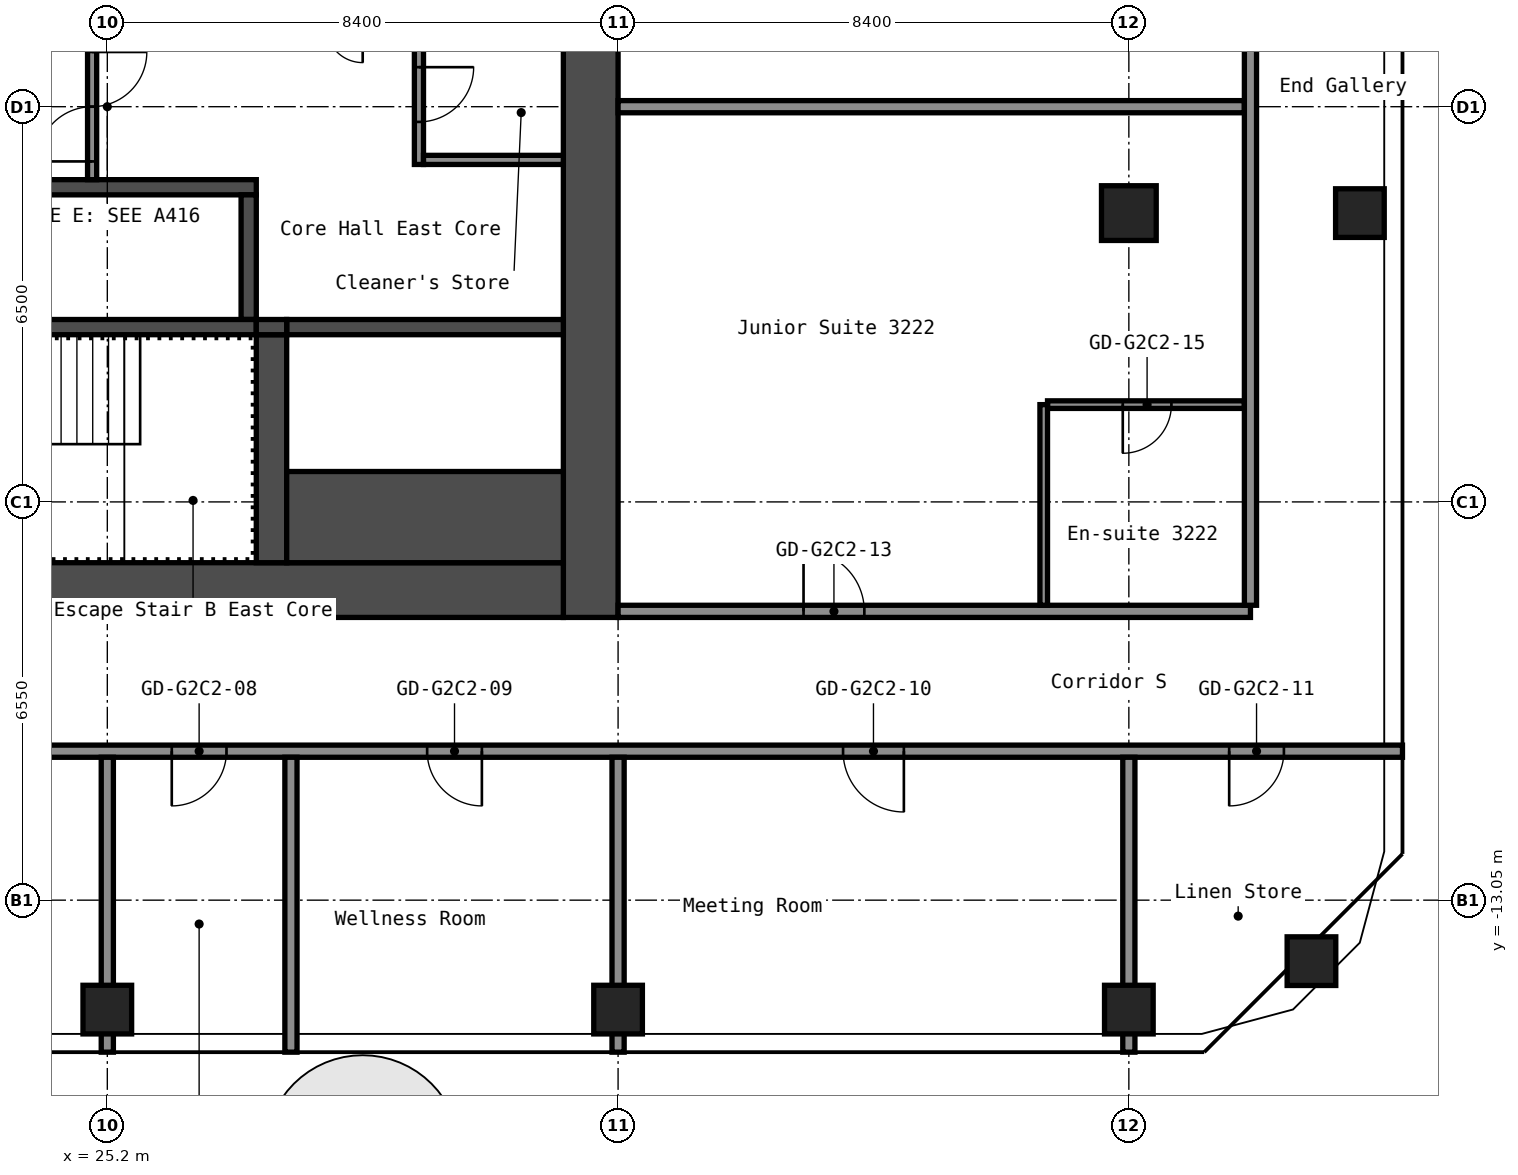
"""IFC4 building model, lengths in metres.
Left out: names, types, materials, properties, quantities, classifications, styles, units other than length and angle.
Written with IfcOpenShell. Run it as: python <this file> out.ifc"""

import sys

from ifc_helpers import new_model, si_unit, direction, frame, frame_2d, origin, origin_2d, place, context, subcontext, project, spatial, rectangle, hollow_rectangle, extrude, element, fill, save


model = new_model("IFC4")
c1 = context("Model", 3, precision=1e-05, world=origin(), true_north=direction((0.0, 1.0)))
c2 = subcontext(c1, "Body", "Model", "MODEL_VIEW")
j1 = project(units=[si_unit("LENGTHUNIT", "METRE"), si_unit("PLANEANGLEUNIT", "RADIAN")], contexts=[c1])
p1 = place(None, origin())
s1 = spatial("IfcSite", under=j1, at=p1, CompositionType="ELEMENT")
p2 = place(p1, origin())
s2 = spatial("IfcBuilding", under=s1, at=p2, CompositionType="ELEMENT")
p3 = place(p2, frame((0.0, 0.0, 113.8)))
s3 = spatial("IfcBuildingStorey", under=s2, at=p3, CompositionType="ELEMENT", Elevation=113.8)
for number, where, z_axis, x_axis in (
    (1, (25.2, -14.85, 0.0), (0.0, 0.0, 1.0), (1.0, 0.0, 0.0)),
    (2, (33.6, -14.85, 0.0), (0.0, 0.0, 1.0), (1.0, 0.0, 0.0)),
    (3, (42.0, -14.85, 0.0), (0.0, 0.0, 1.0), (1.0, 0.0, 0.0)),
):
    element("IfcColumn", number, at=place(p3, frame(where, z_axis=z_axis, x_axis=x_axis)), inside=s3, PredefinedType="COLUMN", context=c2, shape_type="SweptSolid", body=[
        extrude(hollow_rectangle(XDim=0.8, YDim=0.8, WallThickness=0.032, at=origin_2d()), origin(), (0.0, 0.0, 1.0), 2.8),
    ])
p4 = place(p3, frame((42.0, -1.75, 0.0), z_axis=(0.0, 0.0, 1.0), x_axis=(1.0, 0.0, 0.0)))
e4 = element("IfcColumn", 4, at=p4, inside=s3, PredefinedType="COLUMN", context=c2, shape_type="SweptSolid", body=[
    extrude(hollow_rectangle(XDim=0.9, YDim=0.9, WallThickness=0.036, at=origin_2d()), origin(), (0.0, 0.0, 1.0), 2.8),
])
for number, where, z_axis, x_axis in (
    (5, (45.003, -14.053, 0.0), (0.0, 0.0, 1.0), (1.0, 0.0, 0.0)),
    (6, (45.8, -1.75, 0.0), (0.0, 0.0, 1.0), (1.0, 0.0, 0.0)),
):
    element("IfcColumn", number, at=place(p3, frame(where, z_axis=z_axis, x_axis=x_axis)), inside=s3, PredefinedType="COLUMN", context=c2, shape_type="SweptSolid", body=[
        extrude(hollow_rectangle(XDim=0.8, YDim=0.8, WallThickness=0.032, at=origin_2d()), origin(), (0.0, 0.0, 1.0), 2.8),
    ])
p5 = place(p3, frame((33.15, -8.4, 0.0), z_axis=(0.0, 0.0, 1.0), x_axis=(0.0, 1.0, 0.0)))
e7 = element("IfcWall", 7, at=p5, inside=s3, PredefinedType="SHEAR", context=c2, shape_type="SweptSolid", body=[
    extrude(rectangle(XDim=16.8, YDim=0.9, at=frame_2d((8.4, 0.0))), origin(), (0.0, 0.0, 1.0), 2.8),
])
p6 = place(p3, frame((17.7, -7.95, 0.0), z_axis=(0.0, 0.0, 1.0), x_axis=(1.0, 0.0, 0.0)))
e8 = element("IfcWall", 8, at=p6, inside=s3, PredefinedType="SHEAR", context=c2, shape_type="SweptSolid", body=[
    extrude(rectangle(XDim=15.0, YDim=0.9, at=frame_2d((7.5, 0.0))), origin(), (0.0, 0.0, 1.0), 2.8),
])
p7 = place(p6, frame((2.55, 0.0, 0.0)))
e9 = element("IfcOpeningElement", 9, at=p7, cuts=e8, PredefinedType="OPENING", context=c2, shape_type="SweptSolid", body=[
    extrude(rectangle(XDim=1.0, YDim=2.1, at=frame_2d((0.5, 1.05))), frame((0.0, 0.46, 0.0), z_axis=(0.0, -1.0, 0.0), x_axis=(1.0, 0.0, 0.0)), (0.0, 0.0, 1.0), 0.92),
])
p8 = place(p3, frame((20.15, -1.325, 0.0), z_axis=(0.0, 0.0, 1.0), x_axis=(1.0, 0.0, 0.0)))
e10 = element("IfcWall", 10, at=p8, inside=s3, PredefinedType="SHEAR", context=c2, shape_type="SweptSolid", body=[
    extrude(rectangle(XDim=7.5, YDim=0.25, at=frame_2d((3.75, 0.0))), origin(), (0.0, 0.0, 1.0), 2.8),
])
p9 = place(p3, frame((27.525, -3.5, 0.0), z_axis=(0.0, 0.0, 1.0), x_axis=(0.0, 1.0, 0.0)))
e11 = element("IfcWall", 11, at=p9, inside=s3, PredefinedType="SHEAR", context=c2, shape_type="SweptSolid", body=[
    extrude(rectangle(XDim=2.05, YDim=0.25, at=frame_2d((1.025, 0.0))), origin(), (0.0, 0.0, 1.0), 2.8),
])
p10 = place(p3, frame((20.15, -3.625, 0.0), z_axis=(0.0, 0.0, 1.0), x_axis=(1.0, 0.0, 0.0)))
e12 = element("IfcWall", 12, at=p10, inside=s3, PredefinedType="SHEAR", context=c2, shape_type="SweptSolid", body=[
    extrude(rectangle(XDim=7.5, YDim=0.25, at=frame_2d((3.75, 0.0))), origin(), (0.0, 0.0, 1.0), 2.8),
])
p11 = place(p3, frame((27.9, -7.5, 0.0), z_axis=(0.0, 0.0, 1.0), x_axis=(0.0, 1.0, 0.0)))
e13 = element("IfcWall", 13, at=p11, inside=s3, PredefinedType="SHEAR", context=c2, shape_type="SweptSolid", body=[
    extrude(rectangle(XDim=3.75, YDim=0.5, at=frame_2d((1.875, 0.0))), origin(), (0.0, 0.0, 1.0), 2.8),
])
p12 = place(p3, frame((28.15, -3.625, 0.0), z_axis=(0.0, 0.0, 1.0), x_axis=(1.0, 0.0, 0.0)))
e14 = element("IfcWall", 14, at=p12, inside=s3, PredefinedType="SHEAR", context=c2, shape_type="SweptSolid", body=[
    extrude(rectangle(XDim=4.55, YDim=0.25, at=frame_2d((2.275, 0.0))), origin(), (0.0, 0.0, 1.0), 2.8),
])
p13 = place(p3, frame((28.15, -6.75, 0.0), z_axis=(0.0, 0.0, 1.0), x_axis=(1.0, 0.0, 0.0)))
e15 = element("IfcWall", 15, at=p13, inside=s3, PredefinedType="SHEAR", context=c2, shape_type="SweptSolid", body=[
    extrude(rectangle(XDim=4.55, YDim=1.5, at=frame_2d((2.275, 0.0))), origin(), (0.0, 0.0, 1.0), 2.8),
])
p14 = place(p3, frame((27.65, -3.625, 0.0), z_axis=(0.0, 0.0, 1.0), x_axis=(1.0, 0.0, 0.0)))
e16 = element("IfcWall", 16, at=p14, inside=s3, PredefinedType="SHEAR", context=c2, shape_type="SweptSolid", body=[
    extrude(rectangle(XDim=0.5, YDim=0.25, at=frame_2d((0.25, 0.0))), origin(), (0.0, 0.0, 1.0), 2.8),
])
p15 = place(p3, frame((24.95, -1.2, 0.0), z_axis=(0.0, 0.0, 1.0), x_axis=(0.0, 1.0, 0.0)))
e17 = element("IfcWall", 17, at=p15, inside=s3, PredefinedType="PARTITIONING", context=c2, shape_type="SweptSolid", body=[
    extrude(rectangle(XDim=2.4, YDim=0.15, at=frame_2d((1.2, 0.0))), origin(), (0.0, 0.0, 1.0), 2.8),
])
p16 = place(p15, frame((0.3, 0.0, 0.0)))
e18 = element("IfcOpeningElement", 18, at=p16, cuts=e17, PredefinedType="OPENING", context=c2, shape_type="SweptSolid", body=[
    extrude(rectangle(XDim=1.8, YDim=2.1, at=frame_2d((0.9, 1.05))), frame((0.0, 0.085, 0.0), z_axis=(0.0, -1.0, 0.0), x_axis=(1.0, 0.0, 0.0)), (0.0, 0.0, 1.0), 0.17),
])
p17 = place(p3, frame((30.325, -0.95, 0.0), z_axis=(0.0, 0.0, 1.0), x_axis=(0.0, 1.0, 0.0)))
e19 = element("IfcWall", 19, at=p17, inside=s3, PredefinedType="PARTITIONING", context=c2, shape_type="SweptSolid", body=[
    extrude(rectangle(XDim=2.15, YDim=0.15, at=frame_2d((1.075, 0.0))), origin(), (0.0, 0.0, 1.0), 2.8),
])
p18 = place(p17, frame((0.7, 0.0, 0.0)))
e20 = element("IfcOpeningElement", 20, at=p18, cuts=e19, PredefinedType="OPENING", context=c2, shape_type="SweptSolid", body=[
    extrude(rectangle(XDim=0.9, YDim=2.1, at=frame_2d((0.45, 1.05))), frame((0.0, 0.085, 0.0), z_axis=(0.0, -1.0, 0.0), x_axis=(1.0, 0.0, 0.0)), (0.0, 0.0, 1.0), 0.17),
])
p19 = place(p3, frame((30.4, -0.875, 0.0), z_axis=(0.0, 0.0, 1.0), x_axis=(1.0, 0.0, 0.0)))
e21 = element("IfcWall", 21, at=p19, inside=s3, PredefinedType="PARTITIONING", context=c2, shape_type="SweptSolid", body=[
    extrude(rectangle(XDim=2.3, YDim=0.15, at=frame_2d((1.15, 0.0))), origin(), (0.0, 0.0, 1.0), 2.8),
])
p20 = place(p3, frame((16.8, -10.6, 0.0), z_axis=(0.0, 0.0, 1.0), x_axis=(1.0, 0.0, 0.0)))
e22 = element("IfcWall", 22, at=p20, inside=s3, PredefinedType="PARTITIONING", context=c2, shape_type="SweptSolid", body=[
    extrude(rectangle(XDim=29.7, YDim=0.2, at=frame_2d((14.85, 0.0))), origin(), (0.0, 0.0, 1.0), 2.8),
])
p21 = place(p20, frame((3.7, 0.0, 0.0)))
e23 = element("IfcOpeningElement", 23, at=p21, cuts=e22, PredefinedType="OPENING", context=c2, shape_type="SweptSolid", body=[
    extrude(rectangle(XDim=1.0, YDim=2.1, at=frame_2d((0.5, 1.05))), frame((0.0, 0.11, 0.0), z_axis=(0.0, -1.0, 0.0), x_axis=(1.0, 0.0, 0.0)), (0.0, 0.0, 1.0), 0.22),
])
p22 = place(p20, frame((9.46, 0.0, 0.0)))
e24 = element("IfcOpeningElement", 24, at=p22, cuts=e22, PredefinedType="OPENING", context=c2, shape_type="SweptSolid", body=[
    extrude(rectangle(XDim=0.9, YDim=2.1, at=frame_2d((0.45, 1.05))), frame((0.0, 0.11, 0.0), z_axis=(0.0, -1.0, 0.0), x_axis=(1.0, 0.0, 0.0)), (0.0, 0.0, 1.0), 0.22),
])
p23 = place(p20, frame((13.66, 0.0, 0.0)))
e25 = element("IfcOpeningElement", 25, at=p23, cuts=e22, PredefinedType="OPENING", context=c2, shape_type="SweptSolid", body=[
    extrude(rectangle(XDim=0.9, YDim=2.1, at=frame_2d((0.45, 1.05))), frame((0.0, 0.11, 0.0), z_axis=(0.0, -1.0, 0.0), x_axis=(1.0, 0.0, 0.0)), (0.0, 0.0, 1.0), 0.22),
])
p24 = place(p20, frame((20.5, 0.0, 0.0)))
e26 = element("IfcOpeningElement", 26, at=p24, cuts=e22, PredefinedType="OPENING", context=c2, shape_type="SweptSolid", body=[
    extrude(rectangle(XDim=1.0, YDim=2.1, at=frame_2d((0.5, 1.05))), frame((0.0, 0.11, 0.0), z_axis=(0.0, -1.0, 0.0), x_axis=(1.0, 0.0, 0.0)), (0.0, 0.0, 1.0), 0.22),
])
p25 = place(p20, frame((26.85, 0.0, 0.0)))
e27 = element("IfcOpeningElement", 27, at=p25, cuts=e22, PredefinedType="OPENING", context=c2, shape_type="SweptSolid", body=[
    extrude(rectangle(XDim=0.9, YDim=2.1, at=frame_2d((0.45, 1.05))), frame((0.0, 0.11, 0.0), z_axis=(0.0, -1.0, 0.0), x_axis=(1.0, 0.0, 0.0)), (0.0, 0.0, 1.0), 0.22),
])
p26 = place(p3, frame((33.6, -8.3, 0.0), z_axis=(0.0, 0.0, 1.0), x_axis=(1.0, 0.0, 0.0)))
e28 = element("IfcWall", 28, at=p26, inside=s3, PredefinedType="PARTITIONING", context=c2, shape_type="SweptSolid", body=[
    extrude(rectangle(XDim=10.4, YDim=0.2, at=frame_2d((5.2, 0.0))), origin(), (0.0, 0.0, 1.0), 2.8),
])
p27 = place(p26, frame((3.05, 0.0, 0.0)))
e29 = element("IfcOpeningElement", 29, at=p27, cuts=e28, PredefinedType="OPENING", context=c2, shape_type="SweptSolid", body=[
    extrude(rectangle(XDim=1.0, YDim=2.1, at=frame_2d((0.5, 1.05))), frame((0.0, 0.11, 0.0), z_axis=(0.0, -1.0, 0.0), x_axis=(1.0, 0.0, 0.0)), (0.0, 0.0, 1.0), 0.22),
])
p28 = place(p3, frame((40.663, -4.9, 0.0), z_axis=(0.0, 0.0, 1.0), x_axis=(1.0, 0.0, 0.0)))
e30 = element("IfcWall", 30, at=p28, inside=s3, PredefinedType="PARTITIONING", context=c2, shape_type="SweptSolid", body=[
    extrude(rectangle(XDim=3.237, YDim=0.125, at=frame_2d((1.619, 0.0))), origin(), (0.0, 0.0, 1.0), 2.8),
])
p29 = place(p28, frame((1.238, 0.0, 0.0)))
e31 = element("IfcOpeningElement", 31, at=p29, cuts=e30, PredefinedType="OPENING", context=c2, shape_type="SweptSolid", body=[
    extrude(rectangle(XDim=0.8, YDim=2.1, at=frame_2d((0.4, 1.05))), frame((0.0, 0.073, 0.0), z_axis=(0.0, -1.0, 0.0), x_axis=(1.0, 0.0, 0.0)), (0.0, 0.0, 1.0), 0.145),
])
p30 = place(p3, frame((33.6, 0.0, 0.0), z_axis=(0.0, 0.0, 1.0), x_axis=(1.0, 0.0, 0.0)))
e32 = element("IfcWall", 32, at=p30, inside=s3, PredefinedType="PARTITIONING", context=c2, shape_type="SweptSolid", body=[
    extrude(rectangle(XDim=10.3, YDim=0.2, at=frame_2d((5.15, 0.0))), origin(), (0.0, 0.0, 1.0), 2.8),
])
for number, where, z_axis, x_axis in (
    (33, (25.2, -15.55, 0.0), (0.0, 0.0, 1.0), (0.0, 1.0, 0.0)),
    (34, (28.22, -15.55, 0.0), (0.0, 0.0, 1.0), (0.0, 1.0, 0.0)),
    (35, (33.6, -15.55, 0.0), (0.0, 0.0, 1.0), (0.0, 1.0, 0.0)),
):
    element("IfcWall", number, at=place(p3, frame(where, z_axis=z_axis, x_axis=x_axis)), inside=s3, PredefinedType="PARTITIONING", context=c2, shape_type="SweptSolid", body=[
        extrude(rectangle(XDim=4.85, YDim=0.2, at=frame_2d((2.425, 0.0))), origin(), (0.0, 0.0, 1.0), 2.8),
    ])
p31 = place(p3, frame((40.6, -8.2, 0.0), z_axis=(0.0, 0.0, 1.0), x_axis=(0.0, 1.0, 0.0)))
e36 = element("IfcWall", 36, at=p31, inside=s3, PredefinedType="PARTITIONING", context=c2, shape_type="SweptSolid", body=[
    extrude(rectangle(XDim=3.3, YDim=0.125, at=frame_2d((1.65, 0.0))), origin(), (0.0, 0.0, 1.0), 2.8),
])
p32 = place(p3, frame((42.0, -15.55, 0.0), z_axis=(0.0, 0.0, 1.0), x_axis=(0.0, 1.0, 0.0)))
e37 = element("IfcWall", 37, at=p32, inside=s3, PredefinedType="PARTITIONING", context=c2, shape_type="SweptSolid", body=[
    extrude(rectangle(XDim=4.85, YDim=0.2, at=frame_2d((2.425, 0.0))), origin(), (0.0, 0.0, 1.0), 2.8),
])
p33 = place(p3, frame((44.0, -8.2, 0.0), z_axis=(0.0, 0.0, 1.0), x_axis=(0.0, 1.0, 0.0)))
e38 = element("IfcWall", 38, at=p33, inside=s3, PredefinedType="PARTITIONING", context=c2, shape_type="SweptSolid", body=[
    extrude(rectangle(XDim=16.4, YDim=0.2, at=frame_2d((8.2, 0.0))), origin(), (0.0, 0.0, 1.0), 2.8),
])
p34 = place(p16, origin())
e39 = element("IfcDoor", 39, at=p34, inside=s3, OperationType="DOUBLE_DOOR_SINGLE_SWING", PredefinedType="DOOR", context=c2, shape_type="SweptSolid", body=[
    extrude(rectangle(XDim=1.8, YDim=2.1, at=frame_2d((0.9, 1.05))), frame((0.0, 0.025, 0.0), z_axis=(0.0, -1.0, 0.0), x_axis=(1.0, 0.0, 0.0)), (0.0, 0.0, 1.0), 0.05),
])
fill(e18, e39)
p35 = place(p18, origin())
e40 = element("IfcDoor", 40, at=p35, inside=s3, OperationType="SINGLE_SWING_RIGHT", PredefinedType="DOOR", context=c2, shape_type="SweptSolid", body=[
    extrude(rectangle(XDim=0.9, YDim=2.1, at=frame_2d((0.45, 1.05))), frame((0.0, 0.025, 0.0), z_axis=(0.0, -1.0, 0.0), x_axis=(1.0, 0.0, 0.0)), (0.0, 0.0, 1.0), 0.05),
])
fill(e20, e40)
p36 = place(p22, origin())
e41 = element("IfcDoor", 41, at=p36, inside=s3, OperationType="SINGLE_SWING_LEFT", PredefinedType="DOOR", context=c2, shape_type="SweptSolid", body=[
    extrude(rectangle(XDim=0.9, YDim=2.1, at=frame_2d((0.45, 1.05))), frame((0.0, 0.025, 0.0), z_axis=(0.0, -1.0, 0.0), x_axis=(1.0, 0.0, 0.0)), (0.0, 0.0, 1.0), 0.05),
])
fill(e24, e41)
p37 = place(p23, origin())
e42 = element("IfcDoor", 42, at=p37, inside=s3, OperationType="SINGLE_SWING_RIGHT", PredefinedType="DOOR", context=c2, shape_type="SweptSolid", body=[
    extrude(rectangle(XDim=0.9, YDim=2.1, at=frame_2d((0.45, 1.05))), frame((0.0, 0.025, 0.0), z_axis=(0.0, -1.0, 0.0), x_axis=(1.0, 0.0, 0.0)), (0.0, 0.0, 1.0), 0.05),
])
fill(e25, e42)
p38 = place(p24, origin())
e43 = element("IfcDoor", 43, at=p38, inside=s3, OperationType="SINGLE_SWING_RIGHT", PredefinedType="DOOR", context=c2, shape_type="SweptSolid", body=[
    extrude(rectangle(XDim=1.0, YDim=2.1, at=frame_2d((0.5, 1.05))), frame((0.0, 0.025, 0.0), z_axis=(0.0, -1.0, 0.0), x_axis=(1.0, 0.0, 0.0)), (0.0, 0.0, 1.0), 0.05),
])
fill(e26, e43)
p39 = place(p25, origin())
e44 = element("IfcDoor", 44, at=p39, inside=s3, OperationType="SINGLE_SWING_LEFT", PredefinedType="DOOR", context=c2, shape_type="SweptSolid", body=[
    extrude(rectangle(XDim=0.9, YDim=2.1, at=frame_2d((0.45, 1.05))), frame((0.0, 0.025, 0.0), z_axis=(0.0, -1.0, 0.0), x_axis=(1.0, 0.0, 0.0)), (0.0, 0.0, 1.0), 0.05),
])
fill(e27, e44)
p40 = place(p27, origin())
e45 = element("IfcDoor", 45, at=p40, inside=s3, OperationType="SINGLE_SWING_RIGHT", PredefinedType="DOOR", context=c2, shape_type="SweptSolid", body=[
    extrude(rectangle(XDim=1.0, YDim=2.1, at=frame_2d((0.5, 1.05))), frame((0.0, 0.025, 0.0), z_axis=(0.0, -1.0, 0.0), x_axis=(1.0, 0.0, 0.0)), (0.0, 0.0, 1.0), 0.05),
])
fill(e29, e45)
p41 = place(p29, origin())
e46 = element("IfcDoor", 46, at=p41, inside=s3, OperationType="SINGLE_SWING_LEFT", PredefinedType="DOOR", context=c2, shape_type="SweptSolid", body=[
    extrude(rectangle(XDim=0.8, YDim=2.1, at=frame_2d((0.4, 1.05))), frame((0.0, 0.025, 0.0), z_axis=(0.0, -1.0, 0.0), x_axis=(1.0, 0.0, 0.0)), (0.0, 0.0, 1.0), 0.05),
])
fill(e31, e46)
save(model, sys.argv[1])
